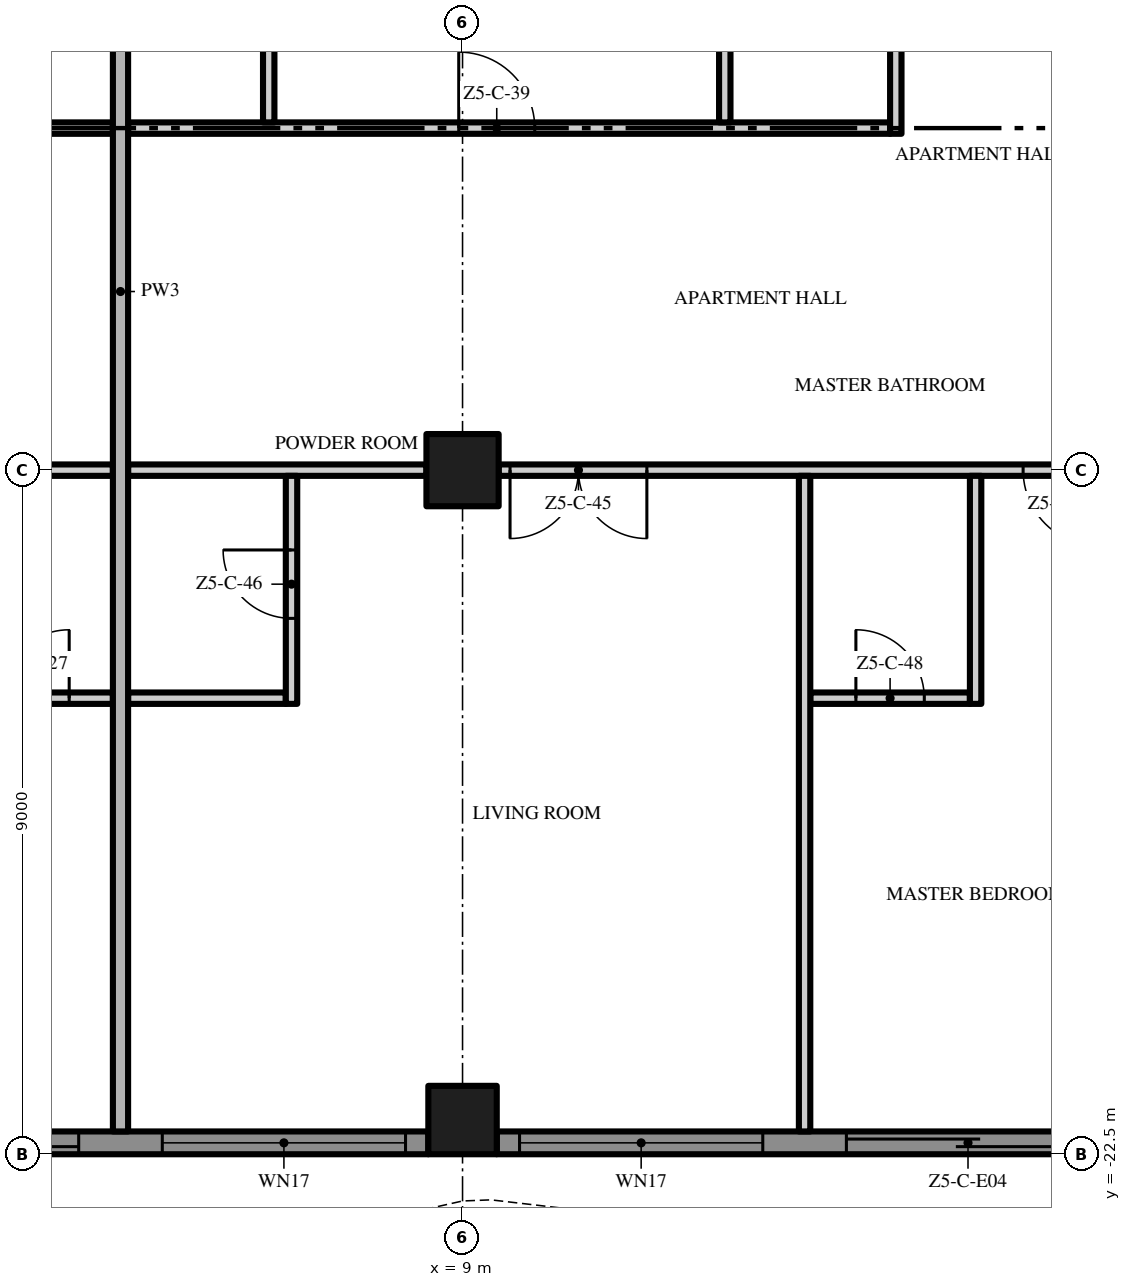
"""IFC4 building model, lengths in metres.
Left out: names, types, materials, properties, quantities, classifications, styles, units other than length and angle.
Written with IfcOpenShell. Run it as: python <this file> out.ifc"""

import sys

from ifc_helpers import new_model, si_unit, direction, frame, frame_2d, origin, origin_2d, place, context, subcontext, project, spatial, polyline, rectangle, outline, extrude, element, fill, save


model = new_model("IFC4")
c1 = context("Model", 3, precision=1e-05, world=origin(), true_north=direction((0.0, 1.0)))
c2 = subcontext(c1, "Body", "Model", "MODEL_VIEW")
j1 = project(units=[si_unit("LENGTHUNIT", "METRE"), si_unit("PLANEANGLEUNIT", "RADIAN")], contexts=[c1])
p1 = place(None, origin())
s1 = spatial("IfcSite", under=j1, at=p1, CompositionType="ELEMENT")
p2 = place(p1, origin())
s2 = spatial("IfcBuilding", under=s1, at=p2, CompositionType="ELEMENT")
p3 = place(p2, frame((0.0, 0.0, 261.6)))
s3 = spatial("IfcBuildingStorey", under=s2, at=p3, CompositionType="ELEMENT", Elevation=261.6)
p4 = place(p3, frame((9.0, -13.5, 0.0), z_axis=(0.0, 0.0, 1.0), x_axis=(1.0, 0.0, 0.0)))
e1 = element("IfcColumn", 1, at=p4, inside=s3, PredefinedType="COLUMN", context=c2, shape_type="SweptSolid", body=[
    extrude(rectangle(XDim=0.95, YDim=0.95, at=origin_2d()), origin(), (0.0, 0.0, 1.0), 3.5),
])
p5 = place(p3, frame((9.0, -22.05, 0.0), z_axis=(0.0, 0.0, 1.0), x_axis=(1.0, 0.0, 0.0)))
e2 = element("IfcColumn", 2, at=p5, inside=s3, PredefinedType="COLUMN", context=c2, shape_type="SweptSolid", body=[
    extrude(rectangle(XDim=0.9, YDim=0.9, at=origin_2d()), origin(), (0.0, 0.0, 1.0), 3.5),
])
p6 = place(p3, frame((8.55, -22.35, 0.0), z_axis=(0.0, 0.0, 1.0), x_axis=(-1.0, 0.0, 0.0)))
e3 = element("IfcWall", 3, at=p6, inside=s3, PredefinedType="SOLIDWALL", context=c2, shape_type="SweptSolid", body=[
    extrude(rectangle(XDim=8.1, YDim=0.3, at=frame_2d((4.05, 0.0))), origin(), (0.0, 0.0, 1.0), 3.5),
])
p7 = place(p6, frame((4.6, 0.0, 0.0)))
e4 = element("IfcOpeningElement", 4, at=p7, cuts=e3, PredefinedType="OPENING", context=c2, shape_type="SweptSolid", body=[
    extrude(rectangle(XDim=3.2, YDim=2.4, at=frame_2d((1.6, 1.2))), frame((0.0, 0.16, 0.0), z_axis=(0.0, -1.0, 0.0), x_axis=(1.0, 0.0, 0.0)), (0.0, 0.0, 1.0), 0.32),
])
p8 = place(p6, frame((0.3, 0.0, 0.45)))
e5 = element("IfcOpeningElement", 5, at=p8, cuts=e3, PredefinedType="OPENING", context=c2, shape_type="SweptSolid", body=[
    extrude(rectangle(XDim=3.2, YDim=2.65, at=frame_2d((1.6, 1.325))), frame((0.0, 0.16, 0.0), z_axis=(0.0, -1.0, 0.0), x_axis=(1.0, 0.0, 0.0)), (0.0, 0.0, 1.0), 0.32),
])
p9 = place(p3, frame((17.55, -22.35, 0.0), z_axis=(0.0, 0.0, 1.0), x_axis=(-1.0, 0.0, 0.0)))
e6 = element("IfcWall", 6, at=p9, inside=s3, PredefinedType="SOLIDWALL", context=c2, shape_type="SweptSolid", body=[
    extrude(rectangle(XDim=8.1, YDim=0.3, at=frame_2d((4.05, 0.0))), origin(), (0.0, 0.0, 1.0), 3.5),
])
p10 = place(p9, frame((4.6, 0.0, 0.45)))
e7 = element("IfcOpeningElement", 7, at=p10, cuts=e6, PredefinedType="OPENING", context=c2, shape_type="SweptSolid", body=[
    extrude(rectangle(XDim=3.2, YDim=2.65, at=frame_2d((1.6, 1.325))), frame((0.0, 0.16, 0.0), z_axis=(0.0, -1.0, 0.0), x_axis=(1.0, 0.0, 0.0)), (0.0, 0.0, 1.0), 0.32),
])
p11 = place(p9, frame((0.3, 0.0, 0.0)))
e8 = element("IfcOpeningElement", 8, at=p11, cuts=e6, PredefinedType="OPENING", context=c2, shape_type="SweptSolid", body=[
    extrude(rectangle(XDim=3.2, YDim=2.4, at=frame_2d((1.6, 1.2))), frame((0.0, 0.16, 0.0), z_axis=(0.0, -1.0, 0.0), x_axis=(1.0, 0.0, 0.0)), (0.0, 0.0, 1.0), 0.32),
])
p12 = place(p3, origin())
e9 = element("IfcWall", 9, at=p12, inside=s3, PredefinedType="USERDEFINED", context=c2, shape_type="SweptSolid", body=[
    extrude(outline(polyline([(-22.5, -23.451), (-21.0, -23.115), (-20.625, -23.1), (-19.5, -23.231), (-18.0, -23.755), (-16.5, -24.488), (-15.0, -25.149), (-13.5, -25.485), (-13.125, -25.5), (-12.0, -25.369), (-10.5, -24.845), (-9.0, -24.112), (-7.5, -23.451), (-6.0, -23.115), (-5.625, -23.1), (-4.5, -23.231), (-3.0, -23.755), (-1.5, -24.488), (0.0, -25.149), (1.5, -25.485), (1.875, -25.5), (3.0, -25.369), (4.5, -24.845), (6.0, -24.112), (7.5, -23.451), (9.0, -23.115), (9.375, -23.1), (10.5, -23.231), (12.0, -23.755), (13.5, -24.488), (15.0, -25.149), (16.5, -25.485), (16.875, -25.5), (18.0, -25.369), (19.5, -24.845), (21.0, -24.112), (22.5, -23.451), (22.399, -23.223), (20.895, -23.885), (19.404, -24.614), (17.944, -25.124), (16.865, -25.249), (16.533, -25.236), (15.079, -24.91), (13.605, -24.261), (12.096, -23.524), (10.556, -22.986), (9.385, -22.849), (8.967, -22.866), (7.421, -23.213), (5.895, -23.885), (4.404, -24.614), (2.944, -25.124), (1.865, -25.249), (1.533, -25.236), (0.079, -24.91), (-1.395, -24.261), (-2.904, -23.524), (-4.444, -22.986), (-5.615, -22.849), (-6.033, -22.866), (-7.579, -23.213), (-9.105, -23.885), (-10.596, -24.614), (-12.056, -25.124), (-13.135, -25.249), (-13.467, -25.236), (-14.921, -24.91), (-16.395, -24.261), (-17.904, -23.524), (-19.444, -22.986), (-20.615, -22.849), (-21.033, -22.866), (-22.555, -23.208), (-22.5, -23.451)])), origin(), (0.0, 0.0, 1.0), 0.9),
])
p13 = place(p3, frame((2.325, -16.5, 0.0), z_axis=(0.0, 0.0, 1.0), x_axis=(1.0, 0.0, 0.0)))
e10 = element("IfcWall", 10, at=p13, inside=s3, PredefinedType="PARTITIONING", context=c2, shape_type="SweptSolid", body=[
    extrude(rectangle(XDim=2.075, YDim=0.15, at=frame_2d((1.038, 0.0))), origin(), (0.0, 0.0, 1.0), 3.5),
])
p14 = place(p13, frame((0.6, 0.0, 0.0)))
e11 = element("IfcOpeningElement", 11, at=p14, cuts=e10, PredefinedType="OPENING", context=c2, shape_type="SweptSolid", body=[
    extrude(rectangle(XDim=0.9, YDim=2.1, at=frame_2d((0.45, 1.05))), frame((0.0, 0.085, 0.0), z_axis=(0.0, -1.0, 0.0), x_axis=(1.0, 0.0, 0.0)), (0.0, 0.0, 1.0), 0.17),
])
p15 = place(p3, frame((4.6, -16.5, 0.0), z_axis=(0.0, 0.0, 1.0), x_axis=(1.0, 0.0, 0.0)))
e12 = element("IfcWall", 12, at=p15, inside=s3, PredefinedType="PARTITIONING", context=c2, shape_type="SweptSolid", body=[
    extrude(rectangle(XDim=2.075, YDim=0.15, at=frame_2d((1.038, 0.0))), origin(), (0.0, 0.0, 1.0), 3.5),
])
p16 = place(p3, frame((13.575, -16.5, 0.0), z_axis=(0.0, 0.0, 1.0), x_axis=(1.0, 0.0, 0.0)))
e13 = element("IfcWall", 13, at=p16, inside=s3, PredefinedType="PARTITIONING", context=c2, shape_type="SweptSolid", body=[
    extrude(rectangle(XDim=2.1, YDim=0.15, at=frame_2d((1.05, 0.0))), origin(), (0.0, 0.0, 1.0), 3.5),
])
p17 = place(p16, frame((0.6, 0.0, 0.0)))
e14 = element("IfcOpeningElement", 14, at=p17, cuts=e13, PredefinedType="OPENING", context=c2, shape_type="SweptSolid", body=[
    extrude(rectangle(XDim=0.9, YDim=2.1, at=frame_2d((0.45, 1.05))), frame((0.0, 0.085, 0.0), z_axis=(0.0, -1.0, 0.0), x_axis=(1.0, 0.0, 0.0)), (0.0, 0.0, 1.0), 0.17),
])
for number, where, z_axis, x_axis in (
    (15, (0.475, -13.5, 0.0), (0.0, 0.0, 1.0), (1.0, 0.0, 0.0)),
    (16, (4.6, -13.5, 0.0), (0.0, 0.0, 1.0), (1.0, 0.0, 0.0)),
):
    element("IfcWall", number, at=place(p3, frame(where, z_axis=z_axis, x_axis=x_axis)), inside=s3, PredefinedType="PARTITIONING", context=c2, shape_type="SweptSolid", body=[
        extrude(rectangle(XDim=3.925, YDim=0.15, at=frame_2d((1.962, 0.0))), origin(), (0.0, 0.0, 1.0), 3.5),
    ])
p18 = place(p3, frame((17.525, -13.5, 0.0), z_axis=(0.0, 0.0, 1.0), x_axis=(-1.0, 0.0, 0.0)))
e17 = element("IfcWall", 17, at=p18, inside=s3, PredefinedType="PARTITIONING", context=c2, shape_type="SweptSolid", body=[
    extrude(rectangle(XDim=8.05, YDim=0.15, at=frame_2d((4.025, 0.0))), origin(), (0.0, 0.0, 1.0), 3.5),
])
p19 = place(p18, frame((6.1, 0.0, 0.0)))
e18 = element("IfcOpeningElement", 18, at=p19, cuts=e17, PredefinedType="OPENING", context=c2, shape_type="SweptSolid", body=[
    extrude(rectangle(XDim=1.8, YDim=2.4, at=frame_2d((0.9, 1.2))), frame((0.0, 0.085, 0.0), z_axis=(0.0, -1.0, 0.0), x_axis=(1.0, 0.0, 0.0)), (0.0, 0.0, 1.0), 0.17),
])
p20 = place(p18, frame((0.15, 0.0, 0.0)))
e19 = element("IfcOpeningElement", 19, at=p20, cuts=e17, PredefinedType="OPENING", context=c2, shape_type="SweptSolid", body=[
    extrude(rectangle(XDim=1.0, YDim=2.4, at=frame_2d((0.5, 1.2))), frame((0.0, 0.085, 0.0), z_axis=(0.0, -1.0, 0.0), x_axis=(1.0, 0.0, 0.0)), (0.0, 0.0, 1.0), 0.17),
])
p21 = place(p3, frame((-11.625, -9.0, 0.0), z_axis=(0.0, 0.0, 1.0), x_axis=(1.0, 0.0, 0.0)))
e20 = element("IfcWall", 20, at=p21, inside=s3, PredefinedType="PARTITIONING", context=c2, shape_type="SweptSolid", body=[
    extrude(rectangle(XDim=16.025, YDim=0.15, at=frame_2d((8.012, 0.0))), origin(), (0.0, 0.0, 1.0), 3.5),
])
p22 = place(p21, frame((4.675, 0.0, 0.0)))
e21 = element("IfcOpeningElement", 21, at=p22, cuts=e20, PredefinedType="OPENING", context=c2, shape_type="SweptSolid", body=[
    extrude(rectangle(XDim=1.0, YDim=2.4, at=frame_2d((0.5, 1.2))), frame((0.0, 0.085, 0.0), z_axis=(0.0, -1.0, 0.0), x_axis=(1.0, 0.0, 0.0)), (0.0, 0.0, 1.0), 0.17),
])
p23 = place(p3, frame((4.6, -9.0, 0.0), z_axis=(0.0, 0.0, 1.0), x_axis=(1.0, 0.0, 0.0)))
e22 = element("IfcWall", 22, at=p23, inside=s3, PredefinedType="PARTITIONING", context=c2, shape_type="SweptSolid", body=[
    extrude(rectangle(XDim=10.025, YDim=0.15, at=frame_2d((5.013, 0.0))), origin(), (0.0, 0.0, 1.0), 3.5),
])
p24 = place(p23, frame((4.35, 0.0, 0.0)))
e23 = element("IfcOpeningElement", 23, at=p24, cuts=e22, PredefinedType="OPENING", context=c2, shape_type="SweptSolid", body=[
    extrude(rectangle(XDim=1.0, YDim=2.4, at=frame_2d((0.5, 1.2))), frame((0.0, 0.085, 0.0), z_axis=(0.0, -1.0, 0.0), x_axis=(1.0, 0.0, 0.0)), (0.0, 0.0, 1.0), 0.17),
])
p25 = place(p3, frame((4.5, -22.2, 0.0), z_axis=(0.0, 0.0, 1.0), x_axis=(0.0, 1.0, 0.0)))
e24 = element("IfcWall", 24, at=p25, inside=s3, PredefinedType="PARTITIONING", context=c2, shape_type="SweptSolid", body=[
    extrude(rectangle(XDim=22.1, YDim=0.2, at=frame_2d((11.05, 0.0))), origin(), (0.0, 0.0, 1.0), 3.5),
])
p26 = place(p3, frame((6.45, -8.925, 0.0), z_axis=(0.0, 0.0, 1.0), x_axis=(0.0, 1.0, 0.0)))
e25 = element("IfcWall", 25, at=p26, inside=s3, PredefinedType="PARTITIONING", context=c2, shape_type="SweptSolid", body=[
    extrude(rectangle(XDim=4.35, YDim=0.15, at=frame_2d((2.175, 0.0))), origin(), (0.0, 0.0, 1.0), 3.5),
])
p27 = place(p3, frame((6.75, -16.575, 0.0), z_axis=(0.0, 0.0, 1.0), x_axis=(0.0, 1.0, 0.0)))
e26 = element("IfcWall", 26, at=p27, inside=s3, PredefinedType="PARTITIONING", context=c2, shape_type="SweptSolid", body=[
    extrude(rectangle(XDim=3.0, YDim=0.15, at=frame_2d((1.5, 0.0))), origin(), (0.0, 0.0, 1.0), 3.5),
])
p28 = place(p27, frame((1.125, 0.0, 0.0)))
e27 = element("IfcOpeningElement", 27, at=p28, cuts=e26, PredefinedType="OPENING", context=c2, shape_type="SweptSolid", body=[
    extrude(rectangle(XDim=0.9, YDim=2.1, at=frame_2d((0.45, 1.05))), frame((0.0, 0.085, 0.0), z_axis=(0.0, -1.0, 0.0), x_axis=(1.0, 0.0, 0.0)), (0.0, 0.0, 1.0), 0.17),
])
p29 = place(p3, frame((12.45, -8.925, 0.0), z_axis=(0.0, 0.0, 1.0), x_axis=(0.0, 1.0, 0.0)))
e28 = element("IfcWall", 28, at=p29, inside=s3, PredefinedType="PARTITIONING", context=c2, shape_type="SweptSolid", body=[
    extrude(rectangle(XDim=4.35, YDim=0.15, at=frame_2d((2.175, 0.0))), origin(), (0.0, 0.0, 1.0), 3.5),
])
p30 = place(p3, frame((13.5, -22.2, 0.0), z_axis=(0.0, 0.0, 1.0), x_axis=(0.0, 1.0, 0.0)))
e29 = element("IfcWall", 29, at=p30, inside=s3, PredefinedType="PARTITIONING", context=c2, shape_type="SweptSolid", body=[
    extrude(rectangle(XDim=8.625, YDim=0.15, at=frame_2d((4.312, 0.0))), origin(), (0.0, 0.0, 1.0), 3.5),
])
p31 = place(p3, frame((14.7, -9.075, 0.0), z_axis=(0.0, 0.0, 1.0), x_axis=(0.0, 1.0, 0.0)))
e30 = element("IfcWall", 30, at=p31, inside=s3, PredefinedType="PARTITIONING", context=c2, shape_type="SweptSolid", body=[
    extrude(rectangle(XDim=4.65, YDim=0.15, at=frame_2d((2.325, 0.0))), origin(), (0.0, 0.0, 1.0), 3.5),
])
p32 = place(p31, frame((1.875, 0.0, 0.0)))
e31 = element("IfcOpeningElement", 31, at=p32, cuts=e30, PredefinedType="OPENING", context=c2, shape_type="SweptSolid", body=[
    extrude(rectangle(XDim=0.9, YDim=2.1, at=frame_2d((0.45, 1.05))), frame((0.0, 0.085, 0.0), z_axis=(0.0, -1.0, 0.0), x_axis=(1.0, 0.0, 0.0)), (0.0, 0.0, 1.0), 0.17),
])
p33 = place(p3, frame((15.75, -16.575, 0.0), z_axis=(0.0, 0.0, 1.0), x_axis=(0.0, 1.0, 0.0)))
e32 = element("IfcWall", 32, at=p33, inside=s3, PredefinedType="PARTITIONING", context=c2, shape_type="SweptSolid", body=[
    extrude(rectangle(XDim=3.0, YDim=0.15, at=frame_2d((1.5, 0.0))), origin(), (0.0, 0.0, 1.0), 3.5),
])
p34 = place(p7, origin())
e33 = element("IfcDoor", 33, at=p34, inside=s3, OperationType="SINGLE_SWING_LEFT", PredefinedType="DOOR", context=c2, shape_type="SweptSolid", body=[
    extrude(rectangle(XDim=3.2, YDim=2.4, at=frame_2d((1.6, 1.2))), frame((0.0, 0.025, 0.0), z_axis=(0.0, -1.0, 0.0), x_axis=(1.0, 0.0, 0.0)), (0.0, 0.0, 1.0), 0.05),
])
fill(e4, e33)
p35 = place(p8, origin())
e34 = element("IfcWindow", 34, at=p35, inside=s3, PartitioningType="SINGLE_PANEL", PredefinedType="WINDOW", context=c2, shape_type="SweptSolid", body=[
    extrude(rectangle(XDim=3.2, YDim=2.65, at=frame_2d((1.6, 1.325))), frame((0.0, 0.03, 0.0), z_axis=(0.0, -1.0, 0.0), x_axis=(1.0, 0.0, 0.0)), (0.0, 0.0, 1.0), 0.06),
])
fill(e5, e34)
p36 = place(p10, origin())
e35 = element("IfcWindow", 35, at=p36, inside=s3, PartitioningType="SINGLE_PANEL", PredefinedType="WINDOW", context=c2, shape_type="SweptSolid", body=[
    extrude(rectangle(XDim=3.2, YDim=2.65, at=frame_2d((1.6, 1.325))), frame((0.0, 0.03, 0.0), z_axis=(0.0, -1.0, 0.0), x_axis=(1.0, 0.0, 0.0)), (0.0, 0.0, 1.0), 0.06),
])
fill(e7, e35)
p37 = place(p11, origin())
e36 = element("IfcDoor", 36, at=p37, inside=s3, OperationType="SINGLE_SWING_LEFT", PredefinedType="DOOR", context=c2, shape_type="SweptSolid", body=[
    extrude(rectangle(XDim=3.2, YDim=2.4, at=frame_2d((1.6, 1.2))), frame((0.0, 0.025, 0.0), z_axis=(0.0, -1.0, 0.0), x_axis=(1.0, 0.0, 0.0)), (0.0, 0.0, 1.0), 0.05),
])
fill(e8, e36)
p38 = place(p14, origin())
e37 = element("IfcDoor", 37, at=p38, inside=s3, OperationType="SINGLE_SWING_RIGHT", PredefinedType="DOOR", context=c2, shape_type="SweptSolid", body=[
    extrude(rectangle(XDim=0.9, YDim=2.1, at=frame_2d((0.45, 1.05))), frame((0.0, 0.025, 0.0), z_axis=(0.0, -1.0, 0.0), x_axis=(1.0, 0.0, 0.0)), (0.0, 0.0, 1.0), 0.05),
])
fill(e11, e37)
p39 = place(p24, origin())
e38 = element("IfcDoor", 38, at=p39, inside=s3, OperationType="SINGLE_SWING_LEFT", PredefinedType="DOOR", context=c2, shape_type="SweptSolid", body=[
    extrude(rectangle(XDim=1.0, YDim=2.4, at=frame_2d((0.5, 1.2))), frame((0.0, 0.025, 0.0), z_axis=(0.0, -1.0, 0.0), x_axis=(1.0, 0.0, 0.0)), (0.0, 0.0, 1.0), 0.05),
])
fill(e23, e38)
p40 = place(p19, origin())
e39 = element("IfcDoor", 39, at=p40, inside=s3, OperationType="DOUBLE_DOOR_SINGLE_SWING", PredefinedType="DOOR", context=c2, shape_type="SweptSolid", body=[
    extrude(rectangle(XDim=1.8, YDim=2.4, at=frame_2d((0.9, 1.2))), frame((0.0, 0.025, 0.0), z_axis=(0.0, -1.0, 0.0), x_axis=(1.0, 0.0, 0.0)), (0.0, 0.0, 1.0), 0.05),
])
fill(e18, e39)
p41 = place(p28, origin())
e40 = element("IfcDoor", 40, at=p41, inside=s3, OperationType="SINGLE_SWING_RIGHT", PredefinedType="DOOR", context=c2, shape_type="SweptSolid", body=[
    extrude(rectangle(XDim=0.9, YDim=2.1, at=frame_2d((0.45, 1.05))), frame((0.0, 0.025, 0.0), z_axis=(0.0, -1.0, 0.0), x_axis=(1.0, 0.0, 0.0)), (0.0, 0.0, 1.0), 0.05),
])
fill(e27, e40)
p42 = place(p20, origin())
e41 = element("IfcDoor", 41, at=p42, inside=s3, OperationType="SINGLE_SWING_LEFT", PredefinedType="DOOR", context=c2, shape_type="SweptSolid", body=[
    extrude(rectangle(XDim=1.0, YDim=2.4, at=frame_2d((0.5, 1.2))), frame((0.0, 0.025, 0.0), z_axis=(0.0, -1.0, 0.0), x_axis=(1.0, 0.0, 0.0)), (0.0, 0.0, 1.0), 0.05),
])
fill(e19, e41)
p43 = place(p17, origin())
e42 = element("IfcDoor", 42, at=p43, inside=s3, OperationType="SINGLE_SWING_LEFT", PredefinedType="DOOR", context=c2, shape_type="SweptSolid", body=[
    extrude(rectangle(XDim=0.9, YDim=2.1, at=frame_2d((0.45, 1.05))), frame((0.0, 0.025, 0.0), z_axis=(0.0, -1.0, 0.0), x_axis=(1.0, 0.0, 0.0)), (0.0, 0.0, 1.0), 0.05),
])
fill(e14, e42)
save(model, sys.argv[1])
